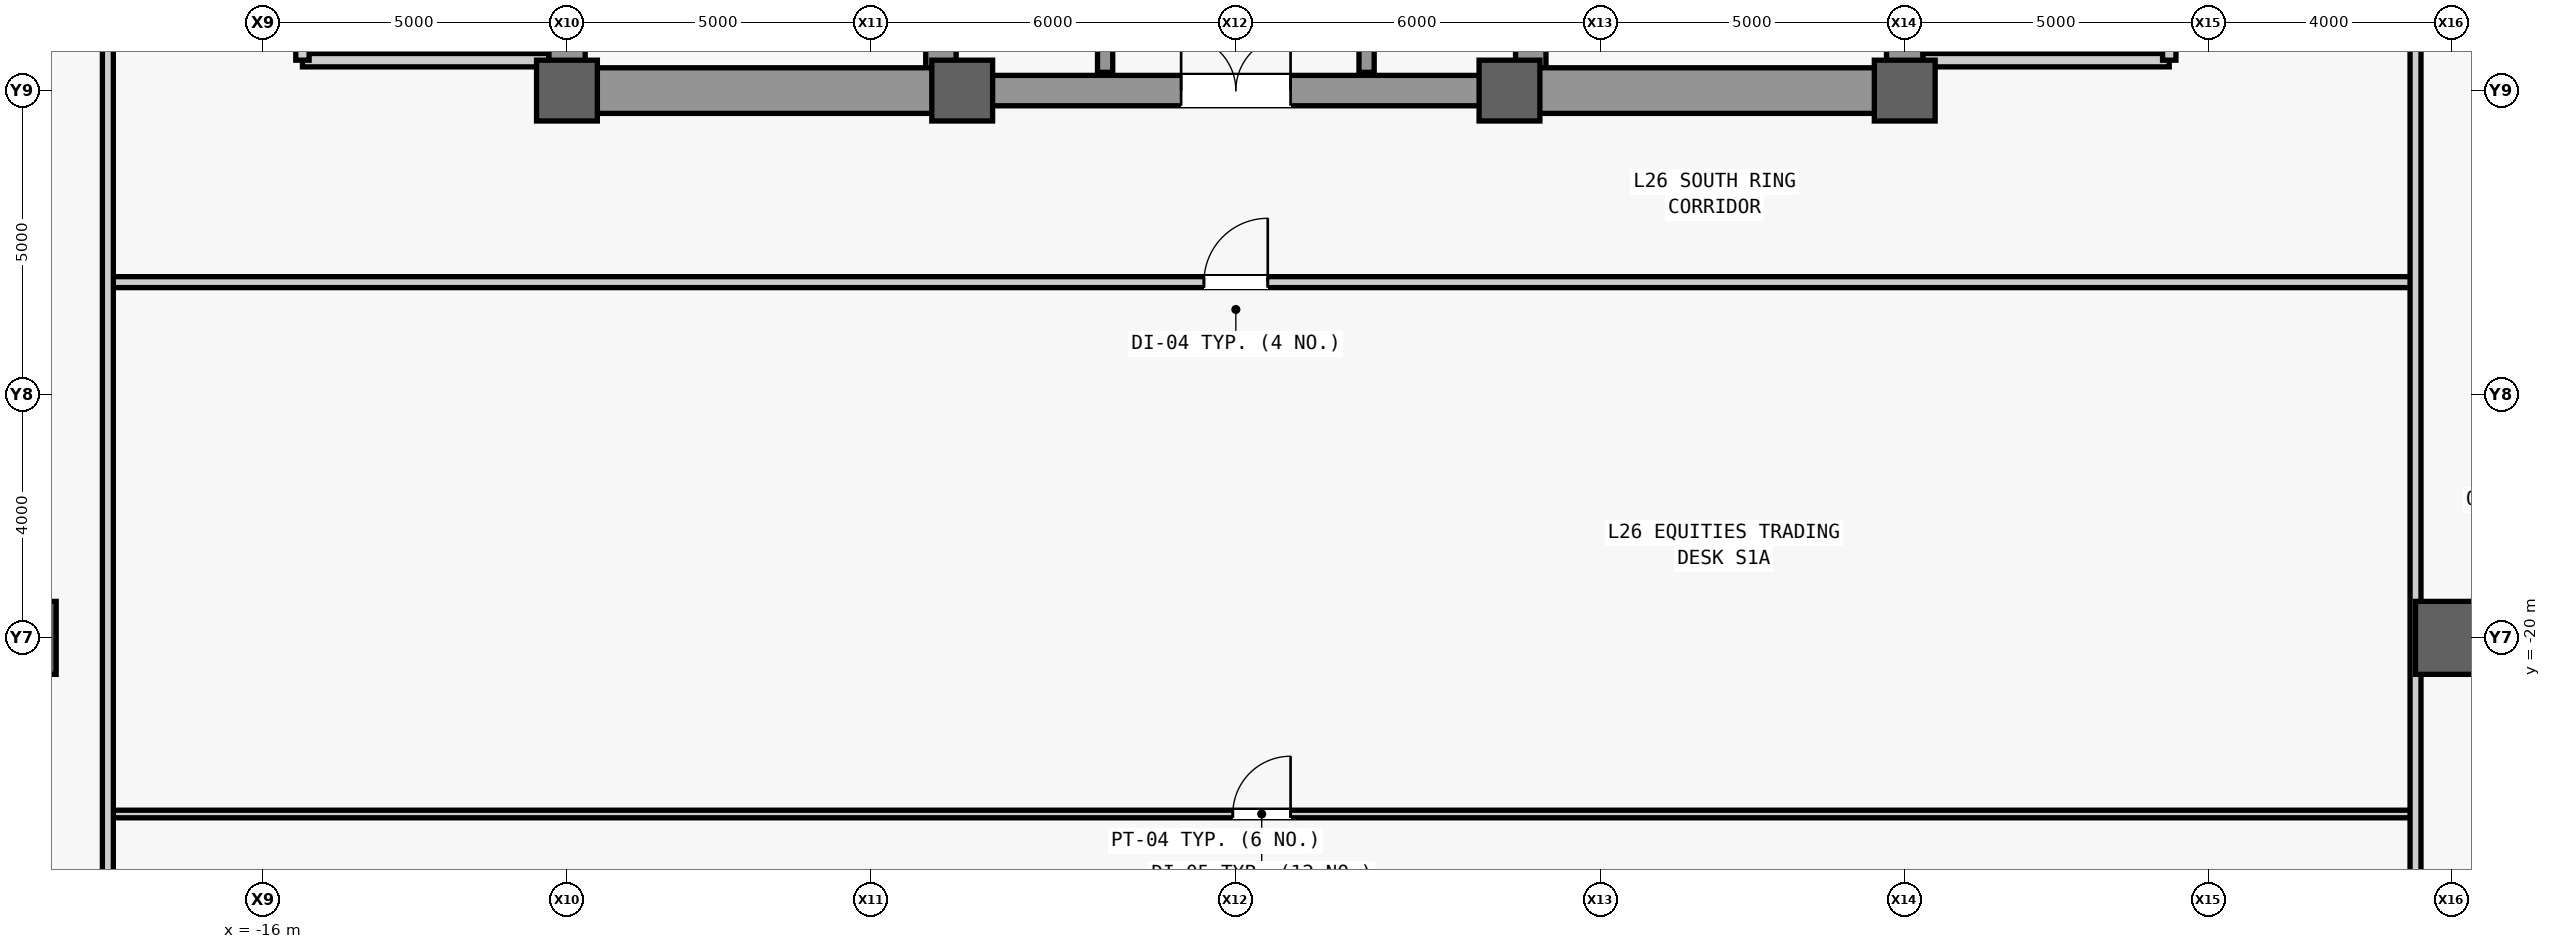
"""IFC4 building model, lengths in metres.
Left out: names, types, materials, properties, quantities, classifications, styles, units other than length and angle.
Written with IfcOpenShell. Run it as: python <this file> out.ifc"""

import sys

from ifc_helpers import new_model, si_unit, direction, frame, frame_2d, origin, origin_2d, place, context, subcontext, project, spatial, rectangle, hollow_rectangle, extrude, source, transform, mapped, element, fill, save


model = new_model("IFC4")
c1 = context("Model", 3, precision=1e-05, world=origin(), true_north=direction((0.0, 1.0)))
c2 = subcontext(c1, "Body", "Model", "MODEL_VIEW")
j1 = project(units=[si_unit("LENGTHUNIT", "METRE"), si_unit("PLANEANGLEUNIT", "RADIAN")], contexts=[c1])
p1 = place(None, origin())
s1 = spatial("IfcSite", under=j1, at=p1, CompositionType="ELEMENT")
p2 = place(p1, origin())
s2 = spatial("IfcBuilding", under=s1, at=p2, CompositionType="ELEMENT")
p3 = place(p2, frame((0.0, 0.0, 116.0)))
s3 = spatial("IfcBuildingStorey", under=s2, at=p3, CompositionType="ELEMENT", Elevation=116.0)
m1 = source(origin(), c2, "Body", "SweptSolid", [
    extrude(rectangle(XDim=22.0, YDim=0.6, at=frame_2d((11.0, 0.0))), origin(), (0.0, 0.0, 1.0), 3.84),
])
p4 = place(p3, frame((-11.0, -11.0, 0.0), z_axis=(0.0, 0.0, 1.0), x_axis=(0.0, 1.0, 0.0)))
e1 = element("IfcWall", 1, at=p4, inside=s3, PredefinedType="SHEAR", context=c2, shape_type="MappedRepresentation", body=[
    mapped(m1, transform((0.0, 0.0, 0.0), scale=1.0)),
])
m2 = source(origin(), c2, "Body", "SweptSolid", [
    extrude(rectangle(XDim=1.1, YDim=2.2, at=frame_2d((0.55, 1.1))), frame((0.0, 0.31, 0.0), z_axis=(0.0, -1.0, 0.0), x_axis=(1.0, 0.0, 0.0)), (0.0, 0.0, 1.0), 0.62),
])
p5 = place(p4, frame((0.8, 0.0, 0.0)))
e2 = element("IfcOpeningElement", 2, at=p5, cuts=e1, PredefinedType="OPENING", context=c2, shape_type="MappedRepresentation", body=[
    mapped(m2, transform((0.0, 0.0, 0.0), scale=1.0)),
])
p6 = place(p4, frame((12.5, 0.0, 0.0)))
e3 = element("IfcOpeningElement", 3, at=p6, cuts=e1, PredefinedType="OPENING", context=c2, shape_type="MappedRepresentation", body=[
    mapped(m2, transform((0.0, 0.0, 0.0), scale=1.0)),
])
m3 = source(origin(), c2, "Body", "SweptSolid", [
    extrude(rectangle(XDim=0.9, YDim=2.15, at=frame_2d((0.45, 1.075))), frame((0.0, 0.31, 0.0), z_axis=(0.0, -1.0, 0.0), x_axis=(1.0, 0.0, 0.0)), (0.0, 0.0, 1.0), 0.62),
])
p7 = place(p4, frame((7.575, 0.0, 0.0)))
e4 = element("IfcOpeningElement", 4, at=p7, cuts=e1, PredefinedType="OPENING", context=c2, shape_type="MappedRepresentation", body=[
    mapped(m3, transform((0.0, 0.0, 0.0), scale=1.0)),
])
m4 = source(origin(), c2, "Body", "SweptSolid", [
    extrude(rectangle(XDim=1.3, YDim=2.3, at=frame_2d((0.65, 1.15))), frame((0.0, 0.31, 0.0), z_axis=(0.0, -1.0, 0.0), x_axis=(1.0, 0.0, 0.0)), (0.0, 0.0, 1.0), 0.62),
])
p8 = place(p4, frame((2.7, 0.0, 0.0)))
e5 = element("IfcOpeningElement", 5, at=p8, cuts=e1, PredefinedType="OPENING", context=c2, shape_type="MappedRepresentation", body=[
    mapped(m4, transform((0.0, 0.0, 0.0), scale=1.0)),
])
p9 = place(p3, frame((11.0, -11.0, 0.0), z_axis=(0.0, 0.0, 1.0), x_axis=(0.0, 1.0, 0.0)))
e6 = element("IfcWall", 6, at=p9, inside=s3, PredefinedType="SHEAR", context=c2, shape_type="MappedRepresentation", body=[
    mapped(m1, transform((0.0, 0.0, 0.0), scale=1.0)),
])
p10 = place(p9, frame((0.8, 0.0, 0.0)))
e7 = element("IfcOpeningElement", 7, at=p10, cuts=e6, PredefinedType="OPENING", context=c2, shape_type="MappedRepresentation", body=[
    mapped(m2, transform((0.0, 0.0, 0.0), scale=1.0)),
])
p11 = place(p9, frame((7.575, 0.0, 0.0)))
e8 = element("IfcOpeningElement", 8, at=p11, cuts=e6, PredefinedType="OPENING", context=c2, shape_type="MappedRepresentation", body=[
    mapped(m3, transform((0.0, 0.0, 0.0), scale=1.0)),
])
p12 = place(p9, frame((2.7, 0.0, 0.0)))
e9 = element("IfcOpeningElement", 9, at=p12, cuts=e6, PredefinedType="OPENING", context=c2, shape_type="MappedRepresentation", body=[
    mapped(m4, transform((0.0, 0.0, 0.0), scale=1.0)),
])
p13 = place(p9, frame((13.35, 0.0, 0.0)))
e10 = element("IfcOpeningElement", 10, at=p13, cuts=e6, PredefinedType="OPENING", context=c2, shape_type="MappedRepresentation", body=[
    mapped(m4, transform((0.0, 0.0, 0.0), scale=1.0)),
])
m5 = source(origin(), c2, "Body", "SweptSolid", [
    extrude(rectangle(XDim=21.4, YDim=0.5, at=frame_2d((10.7, 0.0))), origin(), (0.0, 0.0, 1.0), 3.84),
])
for number, where, z_axis, x_axis in (
    (11, (-4.85, -10.7, 0.0), (0.0, 0.0, 1.0), (0.0, 1.0, 0.0)),
    (12, (4.85, -10.7, 0.0), (0.0, 0.0, 1.0), (0.0, 1.0, 0.0)),
):
    element("IfcWall", number, at=place(p3, frame(where, z_axis=z_axis, x_axis=x_axis)), inside=s3, PredefinedType="SHEAR", context=c2, shape_type="MappedRepresentation", body=[
        mapped(m5, transform((0.0, 0.0, 0.0), scale=1.0)),
    ])
m6 = source(origin(), c2, "Body", "SweptSolid", [
    extrude(rectangle(XDim=5.85, YDim=0.75, at=frame_2d((2.925, 0.0))), origin(), (0.0, 0.0, 1.0), 3.84),
])
for number, where, z_axis, x_axis in (
    (13, (-10.7, -11.0, 0.0), (0.0, 0.0, 1.0), (1.0, 0.0, 0.0)),
    (14, (4.85, -11.0, 0.0), (0.0, 0.0, 1.0), (1.0, 0.0, 0.0)),
):
    element("IfcWall", number, at=place(p3, frame(where, z_axis=z_axis, x_axis=x_axis)), inside=s3, PredefinedType="SHEAR", context=c2, shape_type="MappedRepresentation", body=[
        mapped(m6, transform((0.0, 0.0, 0.0), scale=1.0)),
    ])
m7 = source(origin(), c2, "Body", "SweptSolid", [
    extrude(rectangle(XDim=9.2, YDim=0.5, at=frame_2d((4.6, 0.0))), origin(), (0.0, 0.0, 1.0), 3.84),
])
p14 = place(p3, frame((-4.6, -11.0, 0.0), z_axis=(0.0, 0.0, 1.0), x_axis=(1.0, 0.0, 0.0)))
e15 = element("IfcWall", 15, at=p14, inside=s3, PredefinedType="SHEAR", context=c2, shape_type="MappedRepresentation", body=[
    mapped(m7, transform((0.0, 0.0, 0.0), scale=1.0)),
])
m8 = source(origin(), c2, "Body", "SweptSolid", [
    extrude(rectangle(XDim=1.8, YDim=2.25, at=frame_2d((0.9, 1.125))), frame((0.0, 0.26, 0.0), z_axis=(0.0, -1.0, 0.0), x_axis=(1.0, 0.0, 0.0)), (0.0, 0.0, 1.0), 0.52),
])
p15 = place(p14, frame((3.7, 0.0, 0.0)))
e16 = element("IfcOpeningElement", 16, at=p15, cuts=e15, PredefinedType="OPENING", context=c2, shape_type="MappedRepresentation", body=[
    mapped(m8, transform((0.0, 0.0, 0.0), scale=1.0)),
])
m9 = source(origin(), c2, "Body", "SweptSolid", [
    extrude(hollow_rectangle(XDim=1.2, YDim=1.2, WallThickness=0.07, at=origin_2d()), origin(), (0.0, 0.0, 1.0), 4.1),
])
p16 = place(p3, frame((-20.0, -20.0, 0.0), z_axis=(0.0, 0.0, 1.0), x_axis=(1.0, 0.0, 0.0)))
e17 = element("IfcColumn", 17, at=p16, inside=s3, PredefinedType="COLUMN", context=c2, shape_type="MappedRepresentation", body=[
    mapped(m9, transform((0.0, 0.0, 0.0), scale=1.0)),
])
m10 = source(origin(), c2, "Body", "SweptSolid", [
    extrude(rectangle(XDim=1.0, YDim=1.0, at=origin_2d()), origin(), (0.0, 0.0, 1.0), 4.1),
])
for number, where, z_axis, x_axis in (
    (18, (-11.0, -11.0, 0.0), (0.0, 0.0, 1.0), (1.0, 0.0, 0.0)),
    (19, (-4.5, -11.0, 0.0), (0.0, 0.0, 1.0), (1.0, 0.0, 0.0)),
    (20, (4.5, -11.0, 0.0), (0.0, 0.0, 1.0), (1.0, 0.0, 0.0)),
    (21, (11.0, -11.0, 0.0), (0.0, 0.0, 1.0), (1.0, 0.0, 0.0)),
):
    element("IfcColumn", number, at=place(p3, frame(where, z_axis=z_axis, x_axis=x_axis)), inside=s3, PredefinedType="COLUMN", context=c2, shape_type="MappedRepresentation", body=[
        mapped(m10, transform((0.0, 0.0, 0.0), scale=1.0)),
    ])
p17 = place(p3, frame((20.0, -20.0, 0.0), z_axis=(0.0, 0.0, 1.0), x_axis=(1.0, 0.0, 0.0)))
e22 = element("IfcColumn", 22, at=p17, inside=s3, PredefinedType="COLUMN", context=c2, shape_type="MappedRepresentation", body=[
    mapped(m9, transform((0.0, 0.0, 0.0), scale=1.0)),
])
m11 = source(origin(), c2, "Body", "SweptSolid", [
    extrude(rectangle(XDim=4.05, YDim=0.22, at=frame_2d((2.025, 0.0))), origin(), (0.0, 0.0, 1.0), 3.84),
])
p18 = place(p3, frame((-15.35, -10.5, 0.0), z_axis=(0.0, 0.0, 1.0), x_axis=(1.0, 0.0, 0.0)))
e23 = element("IfcWall", 23, at=p18, inside=s3, PredefinedType="PARTITIONING", context=c2, shape_type="MappedRepresentation", body=[
    mapped(m11, transform((0.0, 0.0, 0.0), scale=1.0)),
])
m12 = source(origin(), c2, "Body", "SweptSolid", [
    extrude(rectangle(XDim=4.4, YDim=0.22, at=frame_2d((2.2, 0.0))), origin(), (0.0, 0.0, 1.0), 3.84),
])
p19 = place(p3, frame((-15.35, -10.5, 0.0), z_axis=(0.0, 0.0, 1.0), x_axis=(0.0, 1.0, 0.0)))
e24 = element("IfcWall", 24, at=p19, inside=s3, PredefinedType="PARTITIONING", context=c2, shape_type="MappedRepresentation", body=[
    mapped(m12, transform((0.0, 0.0, 0.0), scale=1.0)),
])
m13 = source(origin(), c2, "Body", "SweptSolid", [
    extrude(rectangle(XDim=1.2, YDim=2.2, at=frame_2d((0.6, 1.1))), frame((0.0, 0.12, 0.0), z_axis=(0.0, -1.0, 0.0), x_axis=(1.0, 0.0, 0.0)), (0.0, 0.0, 1.0), 0.24),
])
p20 = place(p19, frame((1.6, 0.0, 0.0)))
e25 = element("IfcOpeningElement", 25, at=p20, cuts=e24, PredefinedType="OPENING", context=c2, shape_type="MappedRepresentation", body=[
    mapped(m13, transform((0.0, 0.0, 0.0), scale=1.0)),
])
p21 = place(p3, frame((11.3, -10.5, 0.0), z_axis=(0.0, 0.0, 1.0), x_axis=(1.0, 0.0, 0.0)))
e26 = element("IfcWall", 26, at=p21, inside=s3, PredefinedType="PARTITIONING", context=c2, shape_type="MappedRepresentation", body=[
    mapped(m11, transform((0.0, 0.0, 0.0), scale=1.0)),
])
p22 = place(p3, frame((15.35, -10.5, 0.0), z_axis=(0.0, 0.0, 1.0), x_axis=(0.0, 1.0, 0.0)))
e27 = element("IfcWall", 27, at=p22, inside=s3, PredefinedType="PARTITIONING", context=c2, shape_type="MappedRepresentation", body=[
    mapped(m12, transform((0.0, 0.0, 0.0), scale=1.0)),
])
p23 = place(p22, frame((1.6, 0.0, 0.0)))
e28 = element("IfcOpeningElement", 28, at=p23, cuts=e27, PredefinedType="OPENING", context=c2, shape_type="MappedRepresentation", body=[
    mapped(m13, transform((0.0, 0.0, 0.0), scale=1.0)),
])
m14 = source(origin(), c2, "Body", "SweptSolid", [
    extrude(rectangle(XDim=5.4, YDim=0.25, at=frame_2d((2.7, 0.0))), origin(), (0.0, 0.0, 1.0), 3.84),
])
p24 = place(p3, frame((-2.15, -10.7, 0.0), z_axis=(0.0, 0.0, 1.0), x_axis=(0.0, 1.0, 0.0)))
e29 = element("IfcWall", 29, at=p24, inside=s3, PredefinedType="SHEAR", context=c2, shape_type="MappedRepresentation", body=[
    mapped(m14, transform((0.0, 0.0, 0.0), scale=1.0)),
])
m15 = source(origin(), c2, "Body", "SweptSolid", [
    extrude(rectangle(XDim=1.2, YDim=2.3, at=frame_2d((0.6, 1.15))), frame((0.0, 0.135, 0.0), z_axis=(0.0, -1.0, 0.0), x_axis=(1.0, 0.0, 0.0)), (0.0, 0.0, 1.0), 0.27),
])
p25 = place(p24, frame((0.9, 0.0, 0.0)))
e30 = element("IfcOpeningElement", 30, at=p25, cuts=e29, PredefinedType="OPENING", context=c2, shape_type="MappedRepresentation", body=[
    mapped(m15, transform((0.0, 0.0, 0.0), scale=1.0)),
])
p26 = place(p24, frame((3.2, 0.0, 0.0)))
e31 = element("IfcOpeningElement", 31, at=p26, cuts=e29, PredefinedType="OPENING", context=c2, shape_type="MappedRepresentation", body=[
    mapped(m15, transform((0.0, 0.0, 0.0), scale=1.0)),
])
p27 = place(p3, frame((2.15, -10.7, 0.0), z_axis=(0.0, 0.0, 1.0), x_axis=(0.0, 1.0, 0.0)))
e32 = element("IfcWall", 32, at=p27, inside=s3, PredefinedType="SHEAR", context=c2, shape_type="MappedRepresentation", body=[
    mapped(m14, transform((0.0, 0.0, 0.0), scale=1.0)),
])
p28 = place(p27, frame((0.9, 0.0, 0.0)))
e33 = element("IfcOpeningElement", 33, at=p28, cuts=e32, PredefinedType="OPENING", context=c2, shape_type="MappedRepresentation", body=[
    mapped(m15, transform((0.0, 0.0, 0.0), scale=1.0)),
])
p29 = place(p27, frame((3.2, 0.0, 0.0)))
e34 = element("IfcOpeningElement", 34, at=p29, cuts=e32, PredefinedType="OPENING", context=c2, shape_type="MappedRepresentation", body=[
    mapped(m15, transform((0.0, 0.0, 0.0), scale=1.0)),
])
m16 = source(origin(), c2, "Body", "SweptSolid", [
    extrude(rectangle(XDim=37.95, YDim=0.125, at=frame_2d((18.975, 0.0))), origin(), (0.0, 0.0, 1.0), 3.84),
])
p30 = place(p3, frame((-18.55, -22.896, 0.0), z_axis=(0.0, 0.0, 1.0), x_axis=(1.0, 0.0, 0.0)))
e35 = element("IfcWall", 35, at=p30, inside=s3, PredefinedType="PARTITIONING", context=c2, shape_type="MappedRepresentation", body=[
    mapped(m16, transform((0.0, 0.0, 0.0), scale=1.0)),
])
m17 = source(origin(), c2, "Body", "SweptSolid", [
    extrude(rectangle(XDim=0.95, YDim=2.15, at=frame_2d((0.475, 1.075))), frame((0.0, 0.073, 0.0), z_axis=(0.0, -1.0, 0.0), x_axis=(1.0, 0.0, 0.0)), (0.0, 0.0, 1.0), 0.145),
])
p31 = place(p30, frame((18.5, 0.0, 0.0)))
e36 = element("IfcOpeningElement", 36, at=p31, cuts=e35, PredefinedType="OPENING", context=c2, shape_type="MappedRepresentation", body=[
    mapped(m17, transform((0.0, 0.0, 0.0), scale=1.0)),
])
m18 = source(origin(), c2, "Body", "SweptSolid", [
    extrude(rectangle(XDim=37.95, YDim=0.18, at=frame_2d((18.975, 0.0))), origin(), (0.0, 0.0, 1.0), 3.84),
])
p32 = place(p3, frame((-18.55, -14.15, 0.0), z_axis=(0.0, 0.0, 1.0), x_axis=(1.0, 0.0, 0.0)))
e37 = element("IfcWall", 37, at=p32, inside=s3, PredefinedType="PARTITIONING", context=c2, shape_type="MappedRepresentation", body=[
    mapped(m18, transform((0.0, 0.0, 0.0), scale=1.0)),
])
m19 = source(origin(), c2, "Body", "SweptSolid", [
    extrude(rectangle(XDim=1.05, YDim=2.2, at=frame_2d((0.525, 1.1))), frame((0.0, 0.1, 0.0), z_axis=(0.0, -1.0, 0.0), x_axis=(1.0, 0.0, 0.0)), (0.0, 0.0, 1.0), 0.2),
])
p33 = place(p32, frame((18.025, 0.0, 0.0)))
e38 = element("IfcOpeningElement", 38, at=p33, cuts=e37, PredefinedType="OPENING", context=c2, shape_type="MappedRepresentation", body=[
    mapped(m19, transform((0.0, 0.0, 0.0), scale=1.0)),
])
m20 = source(origin(), c2, "Body", "SweptSolid", [
    extrude(rectangle(XDim=56.0, YDim=0.18, at=frame_2d((28.0, 0.0))), origin(), (0.0, 0.0, 1.0), 3.84),
])
p34 = place(p3, frame((-18.55, -28.0, 0.0), z_axis=(0.0, 0.0, 1.0), x_axis=(0.0, 1.0, 0.0)))
e39 = element("IfcWall", 39, at=p34, inside=s3, PredefinedType="PARTITIONING", context=c2, shape_type="MappedRepresentation", body=[
    mapped(m20, transform((0.0, 0.0, 0.0), scale=1.0)),
])
m21 = source(origin(), c2, "Body", "SweptSolid", [
    extrude(rectangle(XDim=0.95, YDim=2.15, at=frame_2d((0.475, 1.075))), frame((0.0, 0.1, 0.0), z_axis=(0.0, -1.0, 0.0), x_axis=(1.0, 0.0, 0.0)), (0.0, 0.0, 1.0), 0.2),
])
p35 = place(p34, frame((18.002, 0.0, 0.0)))
e40 = element("IfcOpeningElement", 40, at=p35, cuts=e39, PredefinedType="OPENING", context=c2, shape_type="MappedRepresentation", body=[
    mapped(m21, transform((0.0, 0.0, 0.0), scale=1.0)),
])
p36 = place(p34, frame((26.935, 0.0, 0.0)))
e41 = element("IfcOpeningElement", 41, at=p36, cuts=e39, PredefinedType="OPENING", context=c2, shape_type="MappedRepresentation", body=[
    mapped(m21, transform((0.0, 0.0, 0.0), scale=1.0)),
])
p37 = place(p34, frame((36.732, 0.0, 0.0)))
e42 = element("IfcOpeningElement", 42, at=p37, cuts=e39, PredefinedType="OPENING", context=c2, shape_type="MappedRepresentation", body=[
    mapped(m21, transform((0.0, 0.0, 0.0), scale=1.0)),
])
m22 = source(origin(), c2, "Body", "SweptSolid", [
    extrude(rectangle(XDim=56.0, YDim=0.18, at=frame_2d((28.0, 0.0))), origin(), (0.0, 0.0, 1.0), 3.371),
])
p38 = place(p3, frame((19.4, -28.0, 0.0), z_axis=(0.0, 0.0, 1.0), x_axis=(0.0, 1.0, 0.0)))
e43 = element("IfcWall", 43, at=p38, inside=s3, PredefinedType="PARTITIONING", context=c2, shape_type="MappedRepresentation", body=[
    mapped(m22, transform((0.0, 0.0, 0.0), scale=1.0)),
])
p39 = place(p38, frame((20.311, 0.0, 0.0)))
e44 = element("IfcOpeningElement", 44, at=p39, cuts=e43, PredefinedType="OPENING", context=c2, shape_type="MappedRepresentation", body=[
    mapped(m21, transform((0.0, 0.0, 0.0), scale=1.0)),
])
p40 = place(p38, frame((34.135, 0.0, 0.0)))
e45 = element("IfcOpeningElement", 45, at=p40, cuts=e43, PredefinedType="OPENING", context=c2, shape_type="MappedRepresentation", body=[
    mapped(m21, transform((0.0, 0.0, 0.0), scale=1.0)),
])
m23 = source(origin(), c2, "Body", "SweptSolid", [
    extrude(rectangle(XDim=1.8, YDim=2.25, at=frame_2d((0.9, 1.125))), frame((0.0, 0.025, 0.0), z_axis=(0.0, -1.0, 0.0), x_axis=(1.0, 0.0, 0.0)), (0.0, 0.0, 1.0), 0.05),
])
p41 = place(p15, origin())
e46 = element("IfcDoor", 46, at=p41, inside=s3, OperationType="SINGLE_SWING_LEFT", PredefinedType="DOOR", context=c2, shape_type="MappedRepresentation", body=[
    mapped(m23, transform((0.0, 0.0, 0.0), scale=1.0)),
])
fill(e16, e46)
m24 = source(origin(), c2, "Body", "SweptSolid", [
    extrude(rectangle(XDim=0.95, YDim=2.15, at=frame_2d((0.475, 1.075))), frame((0.0, 0.025, 0.0), z_axis=(0.0, -1.0, 0.0), x_axis=(1.0, 0.0, 0.0)), (0.0, 0.0, 1.0), 0.05),
])
p42 = place(p31, origin())
e47 = element("IfcDoor", 47, at=p42, inside=s3, OperationType="SINGLE_SWING_RIGHT", PredefinedType="DOOR", context=c2, shape_type="MappedRepresentation", body=[
    mapped(m24, transform((0.0, 0.0, 0.0), scale=1.0)),
])
fill(e36, e47)
m25 = source(origin(), c2, "Body", "SweptSolid", [
    extrude(rectangle(XDim=1.05, YDim=2.2, at=frame_2d((0.525, 1.1))), frame((0.0, 0.025, 0.0), z_axis=(0.0, -1.0, 0.0), x_axis=(1.0, 0.0, 0.0)), (0.0, 0.0, 1.0), 0.05),
])
p43 = place(p33, origin())
e48 = element("IfcDoor", 48, at=p43, inside=s3, OperationType="SINGLE_SWING_RIGHT", PredefinedType="DOOR", context=c2, shape_type="MappedRepresentation", body=[
    mapped(m25, transform((0.0, 0.0, 0.0), scale=1.0)),
])
fill(e38, e48)
save(model, sys.argv[1])
